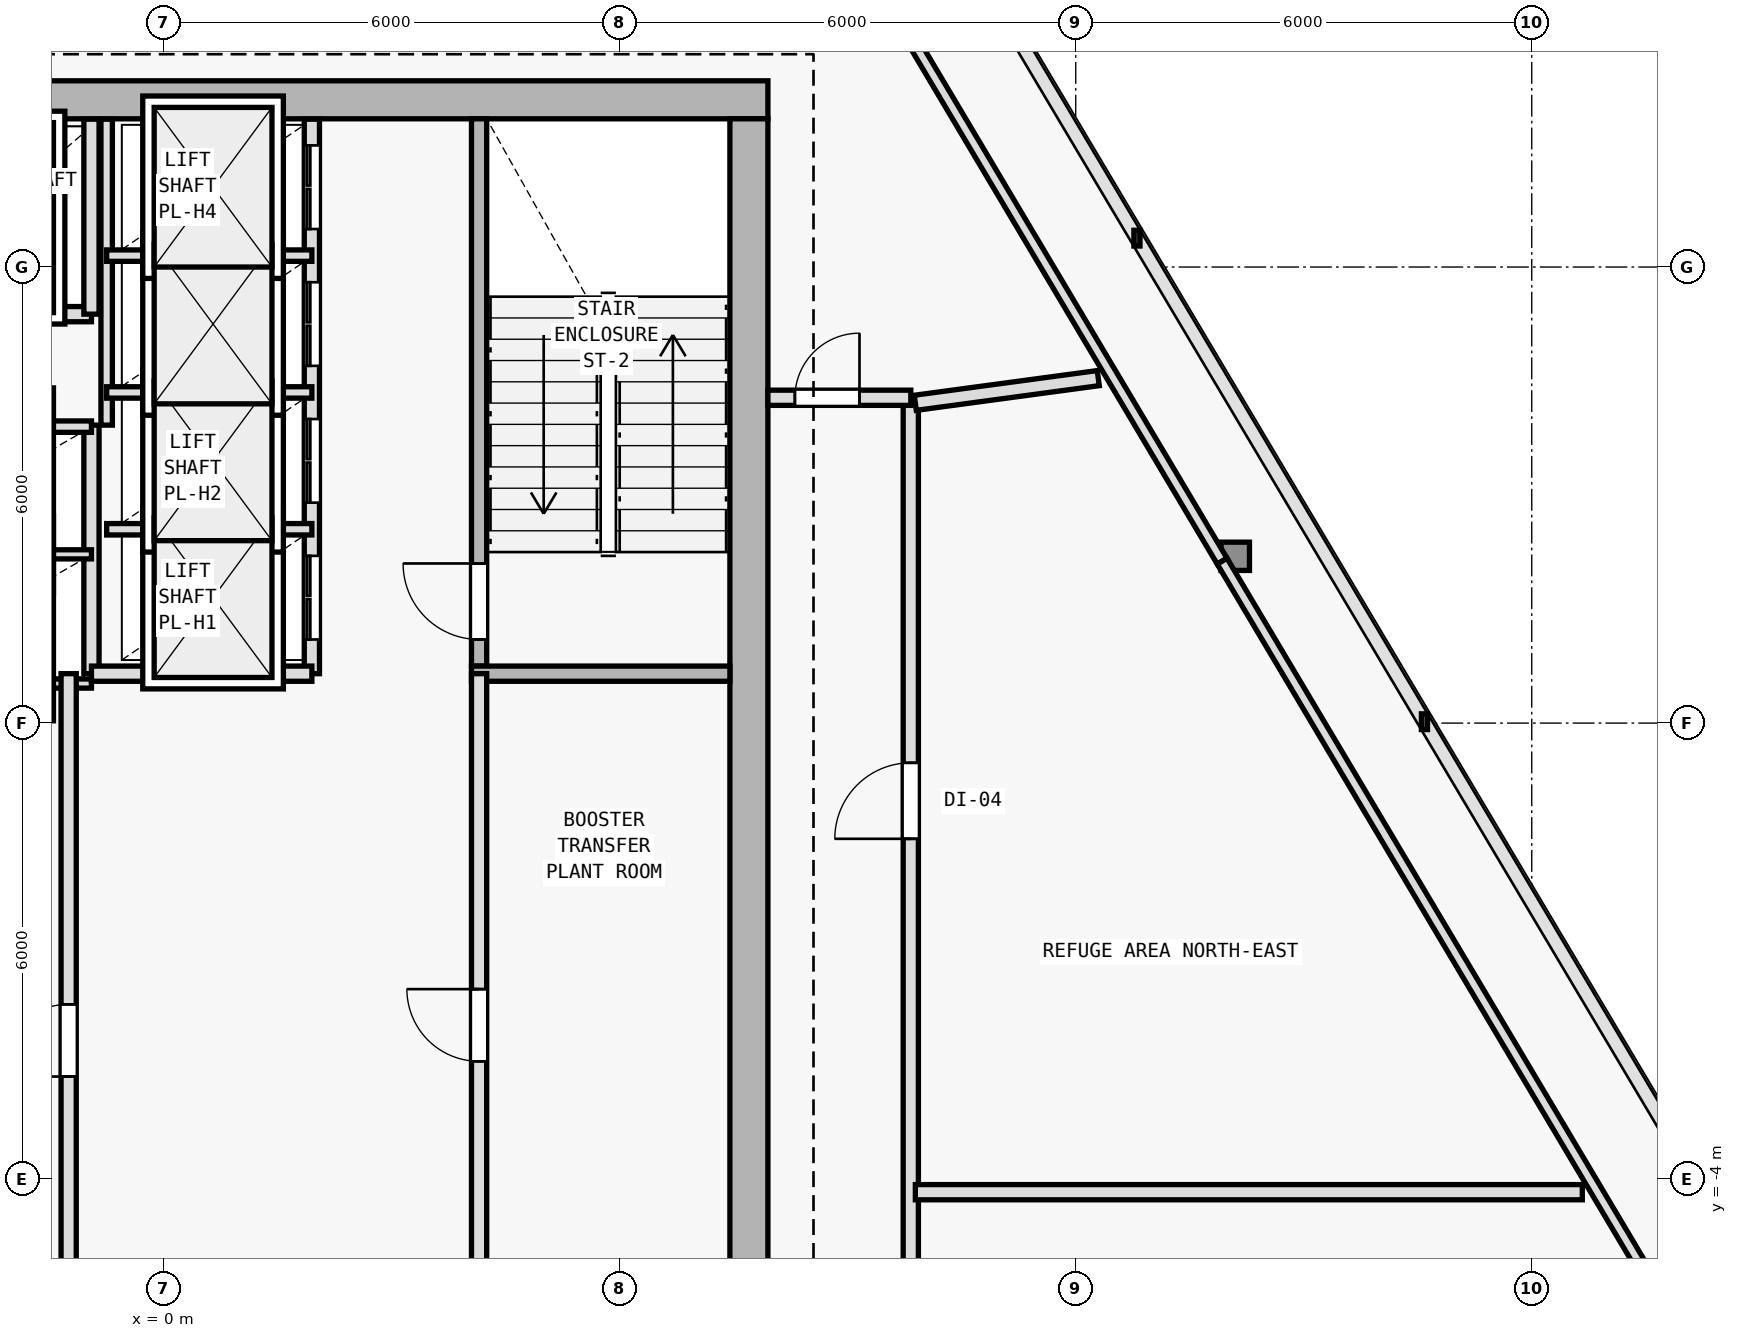
"""IFC4 building model, lengths in metres.
Left out: names, types, materials, properties, quantities, classifications, styles, units other than length and angle.
Written with IfcOpenShell. Run it as: python <this file> out.ifc"""

import sys

from ifc_helpers import new_model, si_unit, direction, frame, frame_2d, origin, origin_2d, place, context, subcontext, project, spatial, rectangle, i_section, extrude, element, fill, save


model = new_model("IFC4")
c1 = context("Model", 3, precision=1e-05, world=origin(), true_north=direction((0.0, 1.0)))
c2 = subcontext(c1, "Body", "Model", "MODEL_VIEW")
j1 = project(units=[si_unit("LENGTHUNIT", "METRE"), si_unit("PLANEANGLEUNIT", "RADIAN")], contexts=[c1])
p1 = place(None, origin())
s1 = spatial("IfcSite", under=j1, at=p1, CompositionType="ELEMENT")
p2 = place(p1, origin())
s2 = spatial("IfcBuilding", under=s1, at=p2, CompositionType="ELEMENT")
p3 = place(p2, frame((0.0, 0.0, 241.5)))
s3 = spatial("IfcBuildingStorey", under=s2, at=p3, CompositionType="ELEMENT", Elevation=241.5)
for number, where, z_axis, x_axis in (
    (1, (7.7, 10.2, 0.0), (0.0, 0.0, 1.0), (1.0, 0.0, 0.0)),
    (2, (7.7, 0.4, 0.0), (0.0, 0.0, 1.0), (1.0, 0.0, 0.0)),
):
    element("IfcColumn", number, at=place(p3, frame(where, z_axis=z_axis, x_axis=x_axis)), inside=s3, PredefinedType="COLUMN", context=c2, shape_type="SweptSolid", body=[
        extrude(i_section(OverallWidth=0.398, OverallDepth=0.387, WebThickness=0.013, FlangeThickness=0.022, FilletRadius=0.015, at=origin_2d()), origin(), (0.0, 0.0, 1.0), 4.8),
    ])
p4 = place(p3, frame((19.763, -5.331, 0.006), z_axis=(-0.020079845425, 0.016614288347, 0.999660324926), x_axis=(-0.637487669625, -0.770460557768, 0.0)))
e3 = element("IfcColumn", 3, at=p4, inside=s3, PredefinedType="COLUMN", context=c2, shape_type="SweptSolid", body=[
    extrude(i_section(OverallWidth=0.374, OverallDepth=0.372, WebThickness=0.012, FlangeThickness=0.02, FilletRadius=0.015, at=origin_2d()), origin(), (0.0, 0.0, 1.0), 4.791),
])
p5 = place(p3, frame((14.099, 4.194, 0.006), z_axis=(-0.01457873563, 0.007340342415, 0.999866781047), x_axis=(-0.449710241045, -0.893174506521, 0.0)))
e4 = element("IfcColumn", 4, at=p5, inside=s3, PredefinedType="COLUMN", context=c2, shape_type="SweptSolid", body=[
    extrude(i_section(OverallWidth=0.374, OverallDepth=0.372, WebThickness=0.012, FlangeThickness=0.02, FilletRadius=0.015, at=origin_2d()), origin(), (0.0, 0.0, 1.0), 4.79),
])
p6 = place(p3, frame((7.95, 10.2, 0.0), z_axis=(0.0, 0.0, 1.0), x_axis=(-1.0, 0.0, 0.0)))
e5 = element("IfcWall", 5, at=p6, inside=s3, PredefinedType="SHEAR", context=c2, shape_type="SweptSolid", body=[
    extrude(rectangle(XDim=15.9, YDim=0.5, at=frame_2d((7.95, 0.0))), origin(), (0.0, 0.0, 1.0), 4.5),
])
p7 = place(p3, frame((7.7, 9.95, 0.0), z_axis=(0.0, 0.0, 1.0), x_axis=(0.0, -1.0, 0.0)))
e6 = element("IfcWall", 6, at=p7, inside=s3, PredefinedType="SHEAR", context=c2, shape_type="SweptSolid", body=[
    extrude(rectangle(XDim=19.1, YDim=0.5, at=frame_2d((9.55, 0.0))), origin(), (0.0, 0.0, 1.0), 4.5),
])
p8 = place(p3, frame((4.15, 2.75, 0.0), z_axis=(0.0, 0.0, 1.0), x_axis=(0.0, 1.0, 0.0)))
e7 = element("IfcWall", 7, at=p8, inside=s3, PredefinedType="SOLIDWALL", context=c2, shape_type="SweptSolid", body=[
    extrude(rectangle(XDim=7.2, YDim=0.2, at=frame_2d((3.6, 0.0))), origin(), (0.0, 0.0, 1.0), 4.5),
])
p9 = place(p8, frame((0.35, 0.0, 0.0)))
e8 = element("IfcOpeningElement", 8, at=p9, cuts=e7, PredefinedType="OPENING", context=c2, shape_type="SweptSolid", body=[
    extrude(rectangle(XDim=1.0, YDim=2.15, at=frame_2d((0.5, 1.075))), frame((0.0, 0.11, 0.0), z_axis=(0.0, -1.0, 0.0), x_axis=(1.0, 0.0, 0.0)), (0.0, 0.0, 1.0), 0.22),
])
p10 = place(p3, frame((4.05, 2.65, 0.0), z_axis=(0.0, 0.0, 1.0), x_axis=(1.0, 0.0, 0.0)))
e9 = element("IfcWall", 9, at=p10, inside=s3, PredefinedType="SOLIDWALL", context=c2, shape_type="SweptSolid", body=[
    extrude(rectangle(XDim=3.4, YDim=0.2, at=frame_2d((1.7, 0.0))), origin(), (0.0, 0.0, 1.0), 4.5),
])
p11 = place(p3, frame((-0.95, 2.65, 0.0), z_axis=(0.0, 0.0, 1.0), x_axis=(0.0, 1.0, 0.0)))
e10 = element("IfcWall", 10, at=p11, inside=s3, PredefinedType="SOLIDWALL", context=c2, shape_type="SweptSolid", body=[
    extrude(rectangle(XDim=3.27, YDim=0.2, at=frame_2d((1.635, 0.0))), origin(), (0.0, 0.0, 1.0), 4.5),
])
for number, where, z_axis, x_axis in (
    (11, (-3.85, 2.52, 0.0), (0.0, 0.0, 1.0), (1.0, 0.0, 0.0)),
    (12, (-3.85, 4.22, 0.0), (0.0, 0.0, 1.0), (1.0, 0.0, 0.0)),
):
    element("IfcWall", number, at=place(p3, frame(where, z_axis=z_axis, x_axis=x_axis)), inside=s3, PredefinedType="PARTITIONING", context=c2, shape_type="SweptSolid", body=[
        extrude(rectangle(XDim=2.9, YDim=0.12, at=frame_2d((1.45, 0.0))), origin(), (0.0, 0.0, 1.0), 4.5),
    ])
p12 = place(p3, frame((-3.85, 5.9, 0.0), z_axis=(0.0, 0.0, 1.0), x_axis=(1.0, 0.0, 0.0)))
e13 = element("IfcWall", 13, at=p12, inside=s3, PredefinedType="PARTITIONING", context=c2, shape_type="SweptSolid", body=[
    extrude(rectangle(XDim=2.9, YDim=0.15, at=frame_2d((1.45, 0.0))), origin(), (0.0, 0.0, 1.0), 4.5),
])
p13 = place(p3, frame((-3.85, 7.38, 0.0), z_axis=(0.0, 0.0, 1.0), x_axis=(1.0, 0.0, 0.0)))
e14 = element("IfcWall", 14, at=p13, inside=s3, PredefinedType="SOLIDWALL", context=c2, shape_type="SweptSolid", body=[
    extrude(rectangle(XDim=2.9, YDim=0.2, at=frame_2d((1.45, 0.0))), origin(), (0.0, 0.0, 1.0), 4.5),
])
p14 = place(p13, frame((0.85, 0.0, 0.0)))
e15 = element("IfcOpeningElement", 15, at=p14, cuts=e14, PredefinedType="OPENING", context=c2, shape_type="SweptSolid", body=[
    extrude(rectangle(XDim=1.2, YDim=2.2, at=frame_2d((0.6, 1.1))), frame((0.0, 0.11, 0.0), z_axis=(0.0, -1.0, 0.0), x_axis=(1.0, 0.0, 0.0)), (0.0, 0.0, 1.0), 0.22),
])
p15 = place(p3, frame((-0.95, 7.38, 0.0), z_axis=(0.0, 0.0, 1.0), x_axis=(0.0, 1.0, 0.0)))
e16 = element("IfcWall", 16, at=p15, inside=s3, PredefinedType="SOLIDWALL", context=c2, shape_type="SweptSolid", body=[
    extrude(rectangle(XDim=2.565, YDim=0.2, at=frame_2d((1.283, 0.0))), origin(), (0.0, 0.0, 1.0), 4.5),
])
p16 = place(p3, frame((4.15, -6.05, 0.0), z_axis=(0.0, 0.0, 1.0), x_axis=(0.0, 1.0, 0.0)))
e17 = element("IfcWall", 17, at=p16, inside=s3, PredefinedType="SOLIDWALL", context=c2, shape_type="SweptSolid", body=[
    extrude(rectangle(XDim=8.7, YDim=0.2, at=frame_2d((4.35, 0.0))), origin(), (0.0, 0.0, 1.0), 4.5),
])
p17 = place(p16, frame((3.6, 0.0, 0.0)))
e18 = element("IfcOpeningElement", 18, at=p17, cuts=e17, PredefinedType="OPENING", context=c2, shape_type="SweptSolid", body=[
    extrude(rectangle(XDim=0.95, YDim=2.1, at=frame_2d((0.475, 1.05))), frame((0.0, 0.11, 0.0), z_axis=(0.0, -1.0, 0.0), x_axis=(1.0, 0.0, 0.0)), (0.0, 0.0, 1.0), 0.22),
])
p18 = place(p3, frame((-1.25, -6.05, 0.0), z_axis=(0.0, 0.0, 1.0), x_axis=(0.0, 1.0, 0.0)))
e19 = element("IfcWall", 19, at=p18, inside=s3, PredefinedType="SOLIDWALL", context=c2, shape_type="SweptSolid", body=[
    extrude(rectangle(XDim=8.7, YDim=0.2, at=frame_2d((4.35, 0.0))), origin(), (0.0, 0.0, 1.0), 4.5),
])
p19 = place(p18, frame((3.4, 0.0, 0.0)))
e20 = element("IfcOpeningElement", 20, at=p19, cuts=e19, PredefinedType="OPENING", context=c2, shape_type="SweptSolid", body=[
    extrude(rectangle(XDim=0.95, YDim=2.1, at=frame_2d((0.475, 1.05))), frame((0.0, 0.11, 0.0), z_axis=(0.0, -1.0, 0.0), x_axis=(1.0, 0.0, 0.0)), (0.0, 0.0, 1.0), 0.22),
])
p20 = place(p3, frame((1.95, 2.65, 0.0), z_axis=(0.0, 0.0, 1.0), x_axis=(0.0, 1.0, 0.0)))
e21 = element("IfcWall", 21, at=p20, inside=s3, PredefinedType="SOLIDWALL", context=c2, shape_type="SweptSolid", body=[
    extrude(rectangle(XDim=7.295, YDim=0.2, at=frame_2d((3.647, 0.0))), origin(), (0.0, 0.0, 1.0), 4.5),
])
p21 = place(p20, frame((0.45, 0.0, 0.0)))
e22 = element("IfcOpeningElement", 22, at=p21, cuts=e21, PredefinedType="OPENING", context=c2, shape_type="SweptSolid", body=[
    extrude(rectangle(XDim=1.1, YDim=2.15, at=frame_2d((0.55, 1.075))), frame((0.0, 0.11, 0.0), z_axis=(0.0, -1.0, 0.0), x_axis=(1.0, 0.0, 0.0)), (0.0, 0.0, 1.0), 0.22),
])
p22 = place(p20, frame((2.25, 0.0, 0.0)))
e23 = element("IfcOpeningElement", 23, at=p22, cuts=e21, PredefinedType="OPENING", context=c2, shape_type="SweptSolid", body=[
    extrude(rectangle(XDim=1.1, YDim=2.15, at=frame_2d((0.55, 1.075))), frame((0.0, 0.11, 0.0), z_axis=(0.0, -1.0, 0.0), x_axis=(1.0, 0.0, 0.0)), (0.0, 0.0, 1.0), 0.22),
])
p23 = place(p20, frame((4.05, 0.0, 0.0)))
e24 = element("IfcOpeningElement", 24, at=p23, cuts=e21, PredefinedType="OPENING", context=c2, shape_type="SweptSolid", body=[
    extrude(rectangle(XDim=1.1, YDim=2.15, at=frame_2d((0.55, 1.075))), frame((0.0, 0.11, 0.0), z_axis=(0.0, -1.0, 0.0), x_axis=(1.0, 0.0, 0.0)), (0.0, 0.0, 1.0), 0.22),
])
p24 = place(p20, frame((5.85, 0.0, 0.0)))
e25 = element("IfcOpeningElement", 25, at=p24, cuts=e21, PredefinedType="OPENING", context=c2, shape_type="SweptSolid", body=[
    extrude(rectangle(XDim=1.1, YDim=2.15, at=frame_2d((0.55, 1.075))), frame((0.0, 0.11, 0.0), z_axis=(0.0, -1.0, 0.0), x_axis=(1.0, 0.0, 0.0)), (0.0, 0.0, 1.0), 0.22),
])
p25 = place(p3, frame((-0.95, 2.65, 0.0), z_axis=(0.0, 0.0, 1.0), x_axis=(1.0, 0.0, 0.0)))
e26 = element("IfcWall", 26, at=p25, inside=s3, PredefinedType="SOLIDWALL", context=c2, shape_type="SweptSolid", body=[
    extrude(rectangle(XDim=2.9, YDim=0.2, at=frame_2d((1.45, 0.0))), origin(), (0.0, 0.0, 1.0), 4.5),
])
p26 = place(p3, frame((-0.75, 5.92, 0.0), z_axis=(0.0, 0.0, 1.0), x_axis=(0.0, 1.0, 0.0)))
e27 = element("IfcWall", 27, at=p26, inside=s3, PredefinedType="PARTITIONING", context=c2, shape_type="SweptSolid", body=[
    extrude(rectangle(XDim=4.025, YDim=0.15, at=frame_2d((2.013, 0.0))), origin(), (0.0, 0.0, 1.0), 4.5),
])
for number, where, z_axis, x_axis in (
    (28, (-0.75, 4.55, 0.0), (0.0, 0.0, 1.0), (1.0, 0.0, 0.0)),
    (29, (-0.75, 6.35, 0.0), (0.0, 0.0, 1.0), (1.0, 0.0, 0.0)),
    (30, (-0.75, 8.15, 0.0), (0.0, 0.0, 1.0), (1.0, 0.0, 0.0)),
):
    element("IfcWall", number, at=place(p3, frame(where, z_axis=z_axis, x_axis=x_axis)), inside=s3, PredefinedType="PARTITIONING", context=c2, shape_type="SweptSolid", body=[
        extrude(rectangle(XDim=2.7, YDim=0.15, at=frame_2d((1.35, 0.0))), origin(), (0.0, 0.0, 1.0), 4.5),
    ])
p27 = place(p3, frame((8.323, 13.554, 0.0), z_axis=(0.0, 0.0, 1.0), x_axis=(0.51109940129, -0.859521612294, 0.0)))
e31 = element("IfcWall", 31, at=p27, inside=s3, PredefinedType="PARTITIONING", context=c2, shape_type="SweptSolid", body=[
    extrude(rectangle(XDim=10.965, YDim=0.15, at=frame_2d((5.482, 0.0))), origin(), (0.0, 0.0, 1.0), 4.125),
])
p28 = place(p3, frame((13.927, 4.13, 0.0), z_axis=(0.0, 0.0, 1.0), x_axis=(0.511085167896, -0.859530075772, 0.0)))
e32 = element("IfcWall", 32, at=p28, inside=s3, PredefinedType="PARTITIONING", context=c2, shape_type="SweptSolid", body=[
    extrude(rectangle(XDim=10.972, YDim=0.15, at=frame_2d((5.486, 0.0))), origin(), (0.0, 0.0, 1.0), 4.025),
])
p29 = place(p3, frame((9.83, -11.53, 0.0), z_axis=(0.0, 0.0, 1.0), x_axis=(0.0, 1.0, 0.0)))
e33 = element("IfcWall", 33, at=p29, inside=s3, PredefinedType="SOLIDWALL", context=c2, shape_type="SweptSolid", body=[
    extrude(rectangle(XDim=17.81, YDim=0.2, at=frame_2d((8.905, 0.0))), origin(), (0.0, 0.0, 1.0), 3.875),
])
p30 = place(p29, frame((3.256, 0.0, 0.0)))
e34 = element("IfcOpeningElement", 34, at=p30, cuts=e33, PredefinedType="OPENING", context=c2, shape_type="SweptSolid", body=[
    extrude(rectangle(XDim=1.0, YDim=2.15, at=frame_2d((0.5, 1.075))), frame((0.0, 0.11, 0.0), z_axis=(0.0, -1.0, 0.0), x_axis=(1.0, 0.0, 0.0)), (0.0, 0.0, 1.0), 0.22),
])
p31 = place(p29, frame((12.008, 0.0, 0.0)))
e35 = element("IfcOpeningElement", 35, at=p31, cuts=e33, PredefinedType="OPENING", context=c2, shape_type="SweptSolid", body=[
    extrude(rectangle(XDim=1.0, YDim=2.15, at=frame_2d((0.5, 1.075))), frame((0.0, 0.11, 0.0), z_axis=(0.0, -1.0, 0.0), x_axis=(1.0, 0.0, 0.0)), (0.0, 0.0, 1.0), 0.22),
])
p32 = place(p3, frame((7.95, 6.28, 0.0), z_axis=(0.0, 0.0, 1.0), x_axis=(1.0, 0.0, 0.0)))
e36 = element("IfcWall", 36, at=p32, inside=s3, PredefinedType="SOLIDWALL", context=c2, shape_type="SweptSolid", body=[
    extrude(rectangle(XDim=1.88, YDim=0.2, at=frame_2d((0.94, 0.0))), origin(), (0.0, 0.0, 1.0), 4.205),
])
p33 = place(p32, frame((0.355, 0.0, 0.0)))
e37 = element("IfcOpeningElement", 37, at=p33, cuts=e36, PredefinedType="OPENING", context=c2, shape_type="SweptSolid", body=[
    extrude(rectangle(XDim=0.85, YDim=2.1, at=frame_2d((0.425, 1.05))), frame((0.0, 0.11, 0.0), z_axis=(0.0, -1.0, 0.0), x_axis=(1.0, 0.0, 0.0)), (0.0, 0.0, 1.0), 0.22),
])
p34 = place(p3, frame((9.89, -4.172, 0.0), z_axis=(0.0, 0.0, 1.0), x_axis=(1.0, 0.0, 0.0)))
e38 = element("IfcWall", 38, at=p34, inside=s3, PredefinedType="SOLIDWALL", context=c2, shape_type="SweptSolid", body=[
    extrude(rectangle(XDim=8.775, YDim=0.2, at=frame_2d((4.388, 0.0))), origin(), (0.0, 0.0, 1.0), 3.875),
])
p35 = place(p3, frame((9.889, 6.214, 0.0), z_axis=(0.0, 0.0, 1.0), x_axis=(0.991015123337, 0.133749860998, 0.0)))
e39 = element("IfcWall", 39, at=p35, inside=s3, PredefinedType="SOLIDWALL", context=c2, shape_type="SweptSolid", body=[
    extrude(rectangle(XDim=2.429, YDim=0.2, at=frame_2d((1.215, 0.0))), origin(), (0.0, 0.0, 1.0), 4.5),
])
p36 = place(p9, origin())
e40 = element("IfcDoor", 40, at=p36, inside=s3, OperationType="SINGLE_SWING_RIGHT", PredefinedType="DOOR", context=c2, shape_type="SweptSolid", body=[
    extrude(rectangle(XDim=1.0, YDim=2.15, at=frame_2d((0.5, 1.075))), frame((0.0, 0.025, 0.0), z_axis=(0.0, -1.0, 0.0), x_axis=(1.0, 0.0, 0.0)), (0.0, 0.0, 1.0), 0.05),
])
fill(e8, e40)
p37 = place(p17, origin())
e41 = element("IfcDoor", 41, at=p37, inside=s3, OperationType="SINGLE_SWING_RIGHT", PredefinedType="DOOR", context=c2, shape_type="SweptSolid", body=[
    extrude(rectangle(XDim=0.95, YDim=2.1, at=frame_2d((0.475, 1.05))), frame((0.0, 0.025, 0.0), z_axis=(0.0, -1.0, 0.0), x_axis=(1.0, 0.0, 0.0)), (0.0, 0.0, 1.0), 0.05),
])
fill(e18, e41)
p38 = place(p19, origin())
e42 = element("IfcDoor", 42, at=p38, inside=s3, OperationType="SINGLE_SWING_LEFT", PredefinedType="DOOR", context=c2, shape_type="SweptSolid", body=[
    extrude(rectangle(XDim=0.95, YDim=2.1, at=frame_2d((0.475, 1.05))), frame((0.0, 0.025, 0.0), z_axis=(0.0, -1.0, 0.0), x_axis=(1.0, 0.0, 0.0)), (0.0, 0.0, 1.0), 0.05),
])
fill(e20, e42)
p39 = place(p21, origin())
e43 = element("IfcDoor", 43, at=p39, inside=s3, OperationType="DOUBLE_DOOR_SLIDING", PredefinedType="DOOR", context=c2, shape_type="SweptSolid", body=[
    extrude(rectangle(XDim=1.1, YDim=2.15, at=frame_2d((0.55, 1.075))), frame((0.0, 0.025, 0.0), z_axis=(0.0, -1.0, 0.0), x_axis=(1.0, 0.0, 0.0)), (0.0, 0.0, 1.0), 0.05),
])
fill(e22, e43)
p40 = place(p22, origin())
e44 = element("IfcDoor", 44, at=p40, inside=s3, OperationType="DOUBLE_DOOR_SLIDING", PredefinedType="DOOR", context=c2, shape_type="SweptSolid", body=[
    extrude(rectangle(XDim=1.1, YDim=2.15, at=frame_2d((0.55, 1.075))), frame((0.0, 0.025, 0.0), z_axis=(0.0, -1.0, 0.0), x_axis=(1.0, 0.0, 0.0)), (0.0, 0.0, 1.0), 0.05),
])
fill(e23, e44)
p41 = place(p23, origin())
e45 = element("IfcDoor", 45, at=p41, inside=s3, OperationType="DOUBLE_DOOR_SLIDING", PredefinedType="DOOR", context=c2, shape_type="SweptSolid", body=[
    extrude(rectangle(XDim=1.1, YDim=2.15, at=frame_2d((0.55, 1.075))), frame((0.0, 0.025, 0.0), z_axis=(0.0, -1.0, 0.0), x_axis=(1.0, 0.0, 0.0)), (0.0, 0.0, 1.0), 0.05),
])
fill(e24, e45)
p42 = place(p24, origin())
e46 = element("IfcDoor", 46, at=p42, inside=s3, OperationType="DOUBLE_DOOR_SLIDING", PredefinedType="DOOR", context=c2, shape_type="SweptSolid", body=[
    extrude(rectangle(XDim=1.1, YDim=2.15, at=frame_2d((0.55, 1.075))), frame((0.0, 0.025, 0.0), z_axis=(0.0, -1.0, 0.0), x_axis=(1.0, 0.0, 0.0)), (0.0, 0.0, 1.0), 0.05),
])
fill(e25, e46)
p43 = place(p31, origin())
e47 = element("IfcDoor", 47, at=p43, inside=s3, OperationType="SINGLE_SWING_LEFT", PredefinedType="DOOR", context=c2, shape_type="SweptSolid", body=[
    extrude(rectangle(XDim=1.0, YDim=2.15, at=frame_2d((0.5, 1.075))), frame((0.0, 0.025, 0.0), z_axis=(0.0, -1.0, 0.0), x_axis=(1.0, 0.0, 0.0)), (0.0, 0.0, 1.0), 0.05),
])
fill(e35, e47)
p44 = place(p33, origin())
e48 = element("IfcDoor", 48, at=p44, inside=s3, OperationType="SINGLE_SWING_RIGHT", PredefinedType="DOOR", context=c2, shape_type="SweptSolid", body=[
    extrude(rectangle(XDim=0.85, YDim=2.1, at=frame_2d((0.425, 1.05))), frame((0.0, 0.025, 0.0), z_axis=(0.0, -1.0, 0.0), x_axis=(1.0, 0.0, 0.0)), (0.0, 0.0, 1.0), 0.05),
])
fill(e37, e48)
save(model, sys.argv[1])
